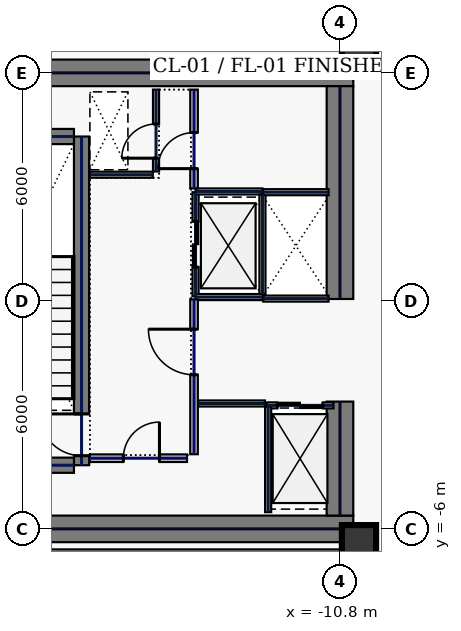
"""IFC4 building model, lengths in metres.
Left out: names, types, materials, properties, quantities, classifications, styles, units other than length and angle.
Written with IfcOpenShell. Run it as: python <this file> out.ifc"""

import sys

from ifc_helpers import new_model, si_unit, direction, frame, frame_2d, origin, origin_2d, place, context, subcontext, project, spatial, rectangle, hollow_rectangle, extrude, element, fill, save


model = new_model("IFC4")
c1 = context("Model", 3, precision=1e-05, world=origin(), true_north=direction((0.0, 1.0)))
c2 = subcontext(c1, "Body", "Model", "MODEL_VIEW")
j1 = project(units=[si_unit("LENGTHUNIT", "METRE"), si_unit("PLANEANGLEUNIT", "RADIAN")], contexts=[c1])
p1 = place(None, origin())
s1 = spatial("IfcSite", under=j1, at=p1, CompositionType="ELEMENT")
p2 = place(p1, origin())
s2 = spatial("IfcBuilding", under=s1, at=p2, CompositionType="ELEMENT")
p3 = place(p2, frame((0.0, 0.0, 164.2)))
s3 = spatial("IfcBuildingStorey", under=s2, at=p3, CompositionType="ELEMENT", Elevation=164.2)
for number, where, z_axis, x_axis in (
    (1, (-22.0, 6.0, 0.0), (0.0, 0.0, 1.0), (1.0, 0.0, 0.0)),
    (2, (-22.0, -6.0, 0.0), (0.0, 0.0, 1.0), (1.0, 0.0, 0.0)),
):
    element("IfcWall", number, at=place(p3, frame(where, z_axis=z_axis, x_axis=x_axis)), inside=s3, PredefinedType="SHEAR", context=c2, shape_type="SweptSolid", body=[
        extrude(rectangle(XDim=11.55, YDim=0.7, at=frame_2d((5.775, 0.0))), origin(), (0.0, 0.0, 1.0), 3.74),
    ])
p4 = place(p3, frame((-10.8, -5.65, 0.0), z_axis=(0.0, 0.0, 1.0), x_axis=(0.0, 1.0, 0.0)))
e3 = element("IfcWall", 3, at=p4, inside=s3, PredefinedType="SHEAR", context=c2, shape_type="SweptSolid", body=[
    extrude(rectangle(XDim=3.0, YDim=0.7, at=frame_2d((1.5, 0.0))), origin(), (0.0, 0.0, 1.0), 3.74),
])
p5 = place(p3, frame((-10.8, 0.05, 0.0), z_axis=(0.0, 0.0, 1.0), x_axis=(0.0, 1.0, 0.0)))
e4 = element("IfcWall", 4, at=p5, inside=s3, PredefinedType="SHEAR", context=c2, shape_type="SweptSolid", body=[
    extrude(rectangle(XDim=5.6, YDim=0.7, at=frame_2d((2.8, 0.0))), origin(), (0.0, 0.0, 1.0), 3.74),
])
p6 = place(p3, frame((-17.6, -4.325, 0.0), z_axis=(0.0, 0.0, 1.0), x_axis=(0.0, 1.0, 0.0)))
e5 = element("IfcWall", 5, at=p6, inside=s3, PredefinedType="SHEAR", context=c2, shape_type="SweptSolid", body=[
    extrude(rectangle(XDim=8.65, YDim=0.4, at=frame_2d((4.325, 0.0))), origin(), (0.0, 0.0, 1.0), 3.74),
])
p7 = place(p6, frame((0.25, 0.0, 0.0)))
e6 = element("IfcOpeningElement", 6, at=p7, cuts=e5, PredefinedType="OPENING", context=c2, shape_type="SweptSolid", body=[
    extrude(rectangle(XDim=1.1, YDim=2.2, at=frame_2d((0.55, 1.1))), frame((0.0, 0.21, 0.0), z_axis=(0.0, -1.0, 0.0), x_axis=(1.0, 0.0, 0.0)), (0.0, 0.0, 1.0), 0.42),
])
for number, where, z_axis, x_axis in (
    (7, (-21.2, -4.325, 0.0), (0.0, 0.0, 1.0), (1.0, 0.0, 0.0)),
    (8, (-21.2, 4.325, 0.0), (0.0, 0.0, 1.0), (1.0, 0.0, 0.0)),
):
    element("IfcWall", number, at=place(p3, frame(where, z_axis=z_axis, x_axis=x_axis)), inside=s3, PredefinedType="SHEAR", context=c2, shape_type="SweptSolid", body=[
        extrude(rectangle(XDim=3.4, YDim=0.4, at=frame_2d((1.7, 0.0))), origin(), (0.0, 0.0, 1.0), 3.74),
    ])
for number, where, z_axis, x_axis in (
    (9, (-10.3, -6.35, 0.0), (0.0, 0.0, 1.0), (1.0, 0.0, 0.0)),
    (10, (-10.3, 6.35, 0.0), (0.0, 0.0, 1.0), (1.0, 0.0, 0.0)),
):
    element("IfcColumn", number, at=place(p3, frame(where, z_axis=z_axis, x_axis=x_axis)), inside=s3, PredefinedType="COLUMN", context=c2, shape_type="SweptSolid", body=[
        extrude(hollow_rectangle(XDim=0.9, YDim=0.9, WallThickness=0.04, at=origin_2d()), origin(), (0.0, 0.0, 1.0), 3.74),
    ])
p8 = place(p3, frame((-14.6, 0.12, 0.0), z_axis=(0.0, 0.0, 1.0), x_axis=(0.0, 1.0, 0.0)))
e11 = element("IfcWall", 11, at=p8, inside=s3, PredefinedType="PARTITIONING", context=c2, shape_type="SweptSolid", body=[
    extrude(rectangle(XDim=2.74, YDim=0.16, at=frame_2d((1.37, 0.0))), origin(), (0.0, 0.0, 1.0), 3.74),
])
p9 = place(p8, frame((0.77, 0.0, 0.0)))
e12 = element("IfcOpeningElement", 12, at=p9, cuts=e11, PredefinedType="OPENING", context=c2, shape_type="SweptSolid", body=[
    extrude(rectangle(XDim=1.2, YDim=2.2, at=frame_2d((0.6, 1.1))), frame((0.0, 0.09, 0.0), z_axis=(0.0, -1.0, 0.0), x_axis=(1.0, 0.0, 0.0)), (0.0, 0.0, 1.0), 0.18),
])
for number, where, z_axis, x_axis in (
    (13, (-14.6, 0.1, 0.0), (0.0, 0.0, 1.0), (1.0, 0.0, 0.0)),
    (14, (-14.6, 2.88, 0.0), (0.0, 0.0, 1.0), (1.0, 0.0, 0.0)),
):
    element("IfcWall", number, at=place(p3, frame(where, z_axis=z_axis, x_axis=x_axis)), inside=s3, PredefinedType="PARTITIONING", context=c2, shape_type="SweptSolid", body=[
        extrude(rectangle(XDim=1.76, YDim=0.16, at=frame_2d((0.88, 0.0))), origin(), (0.0, 0.0, 1.0), 3.74),
    ])
p10 = place(p3, frame((-12.84, 0.18, 0.0), z_axis=(0.0, 0.0, 1.0), x_axis=(0.0, 1.0, 0.0)))
e15 = element("IfcWall", 15, at=p10, inside=s3, PredefinedType="PARTITIONING", context=c2, shape_type="SweptSolid", body=[
    extrude(rectangle(XDim=2.62, YDim=0.16, at=frame_2d((1.31, 0.0))), origin(), (0.0, 0.0, 1.0), 3.74),
])
p11 = place(p3, frame((-12.73, -2.75, 0.0), z_axis=(0.0, 0.0, 1.0), x_axis=(1.0, 0.0, 0.0)))
e16 = element("IfcWall", 16, at=p11, inside=s3, PredefinedType="PARTITIONING", context=c2, shape_type="SweptSolid", body=[
    extrude(rectangle(XDim=1.76, YDim=0.16, at=frame_2d((0.88, 0.0))), origin(), (0.0, 0.0, 1.0), 3.74),
])
p12 = place(p11, frame((0.28, 0.0, 0.0)))
e17 = element("IfcOpeningElement", 17, at=p12, cuts=e16, PredefinedType="OPENING", context=c2, shape_type="SweptSolid", body=[
    extrude(rectangle(XDim=1.2, YDim=2.2, at=frame_2d((0.6, 1.1))), frame((0.0, 0.09, 0.0), z_axis=(0.0, -1.0, 0.0), x_axis=(1.0, 0.0, 0.0)), (0.0, 0.0, 1.0), 0.18),
])
for number, where, z_axis, x_axis in (
    (18, (-12.82, 0.06, 0.0), (0.0, 0.0, 1.0), (1.0, 0.0, 0.0)),
    (19, (-12.82, 2.86, 0.0), (0.0, 0.0, 1.0), (1.0, 0.0, 0.0)),
):
    element("IfcWall", number, at=place(p3, frame(where, z_axis=z_axis, x_axis=x_axis)), inside=s3, PredefinedType="PARTITIONING", context=c2, shape_type="SweptSolid", body=[
        extrude(rectangle(XDim=1.72, YDim=0.16, at=frame_2d((0.86, 0.0))), origin(), (0.0, 0.0, 1.0), 3.74),
    ])
p13 = place(p3, frame((-15.64, 3.405, 0.0), z_axis=(0.0, 0.0, 1.0), x_axis=(0.0, 1.0, 0.0)))
e20 = element("IfcWall", 20, at=p13, inside=s3, PredefinedType="PARTITIONING", context=c2, shape_type="SweptSolid", body=[
    extrude(rectangle(XDim=2.155, YDim=0.16, at=frame_2d((1.078, 0.0))), origin(), (0.0, 0.0, 1.0), 3.74),
])
p14 = place(p13, frame((0.35, 0.0, 0.0)))
e21 = element("IfcOpeningElement", 21, at=p14, cuts=e20, PredefinedType="OPENING", context=c2, shape_type="SweptSolid", body=[
    extrude(rectangle(XDim=0.9, YDim=2.2, at=frame_2d((0.45, 1.1))), frame((0.0, 0.09, 0.0), z_axis=(0.0, -1.0, 0.0), x_axis=(1.0, 0.0, 0.0)), (0.0, 0.0, 1.0), 0.18),
])
p15 = place(p3, frame((-17.38, 3.32, 0.0), z_axis=(0.0, 0.0, 1.0), x_axis=(1.0, 0.0, 0.0)))
e22 = element("IfcWall", 22, at=p15, inside=s3, PredefinedType="PARTITIONING", context=c2, shape_type="SweptSolid", body=[
    extrude(rectangle(XDim=1.655, YDim=0.16, at=frame_2d((0.827, 0.0))), origin(), (0.0, 0.0, 1.0), 3.74),
])
p16 = place(p3, frame((-17.38, -4.14, 0.0), z_axis=(0.0, 0.0, 1.0), x_axis=(1.0, 0.0, 0.0)))
e23 = element("IfcWall", 23, at=p16, inside=s3, PredefinedType="SOLIDWALL", context=c2, shape_type="SweptSolid", body=[
    extrude(rectangle(XDim=2.555, YDim=0.2, at=frame_2d((1.277, 0.0))), origin(), (0.0, 0.0, 1.0), 3.74),
])
p17 = place(p16, frame((0.88, 0.0, 0.0)))
e24 = element("IfcOpeningElement", 24, at=p17, cuts=e23, PredefinedType="OPENING", context=c2, shape_type="SweptSolid", body=[
    extrude(rectangle(XDim=0.95, YDim=2.2, at=frame_2d((0.475, 1.1))), frame((0.0, 0.11, 0.0), z_axis=(0.0, -1.0, 0.0), x_axis=(1.0, 0.0, 0.0)), (0.0, 0.0, 1.0), 0.22),
])
p18 = place(p3, frame((-14.535, -2.7, 0.0), z_axis=(0.0, 0.0, 1.0), x_axis=(1.0, 0.0, 0.0)))
e25 = element("IfcWall", 25, at=p18, inside=s3, PredefinedType="PARTITIONING", context=c2, shape_type="SweptSolid", body=[
    extrude(rectangle(XDim=1.76, YDim=0.16, at=frame_2d((0.88, 0.0))), origin(), (0.0, 0.0, 1.0), 3.74),
])
p19 = place(p3, frame((-12.69, -5.56, 0.0), z_axis=(0.0, 0.0, 1.0), x_axis=(0.0, 1.0, 0.0)))
e26 = element("IfcWall", 26, at=p19, inside=s3, PredefinedType="PARTITIONING", context=c2, shape_type="SweptSolid", body=[
    extrude(rectangle(XDim=2.775, YDim=0.16, at=frame_2d((1.388, 0.0))), origin(), (0.0, 0.0, 1.0), 3.74),
])
p20 = place(p3, frame((-14.64, 2.96, 0.0), z_axis=(0.0, 0.0, 1.0), x_axis=(0.0, 1.0, 0.0)))
e27 = element("IfcWall", 27, at=p20, inside=s3, PredefinedType="SOLIDWALL", context=c2, shape_type="SweptSolid", body=[
    extrude(rectangle(XDim=2.6, YDim=0.2, at=frame_2d((1.3, 0.0))), origin(), (0.0, 0.0, 1.0), 3.74),
])
p21 = place(p20, frame((0.52, 0.0, 0.0)))
e28 = element("IfcOpeningElement", 28, at=p21, cuts=e27, PredefinedType="OPENING", context=c2, shape_type="SweptSolid", body=[
    extrude(rectangle(XDim=0.95, YDim=2.2, at=frame_2d((0.475, 1.1))), frame((0.0, 0.11, 0.0), z_axis=(0.0, -1.0, 0.0), x_axis=(1.0, 0.0, 0.0)), (0.0, 0.0, 1.0), 0.22),
])
p22 = place(p3, frame((-14.64, -4.035, 0.0), z_axis=(0.0, 0.0, 1.0), x_axis=(0.0, 1.0, 0.0)))
e29 = element("IfcWall", 29, at=p22, inside=s3, PredefinedType="SOLIDWALL", context=c2, shape_type="SweptSolid", body=[
    extrude(rectangle(XDim=4.075, YDim=0.2, at=frame_2d((2.038, 0.0))), origin(), (0.0, 0.0, 1.0), 3.74),
])
p23 = place(p22, frame((2.09, 0.0, 0.0)))
e30 = element("IfcOpeningElement", 30, at=p23, cuts=e29, PredefinedType="OPENING", context=c2, shape_type="SweptSolid", body=[
    extrude(rectangle(XDim=1.2, YDim=2.2, at=frame_2d((0.6, 1.1))), frame((0.0, 0.11, 0.0), z_axis=(0.0, -1.0, 0.0), x_axis=(1.0, 0.0, 0.0)), (0.0, 0.0, 1.0), 0.22),
])
p24 = place(p3, frame((-24.965, -6.62, 0.0), z_axis=(0.0, 0.0, 1.0), x_axis=(1.0, 0.0, 0.0)))
e31 = element("IfcWall", 31, at=p24, inside=s3, PredefinedType="PARTITIONING", context=c2, shape_type="SweptSolid", body=[
    extrude(rectangle(XDim=14.335, YDim=0.16, at=frame_2d((7.167, 0.0))), origin(), (0.0, 0.0, 1.0), 3.74),
])
p25 = place(p7, origin())
e32 = element("IfcDoor", 32, at=p25, inside=s3, OperationType="SINGLE_SWING_RIGHT", PredefinedType="DOOR", context=c2, shape_type="SweptSolid", body=[
    extrude(rectangle(XDim=1.1, YDim=2.2, at=frame_2d((0.55, 1.1))), frame((0.0, 0.025, 0.0), z_axis=(0.0, -1.0, 0.0), x_axis=(1.0, 0.0, 0.0)), (0.0, 0.0, 1.0), 0.05),
])
fill(e6, e32)
p26 = place(p9, origin())
e33 = element("IfcDoor", 33, at=p26, inside=s3, OperationType="SLIDING_TO_LEFT", PredefinedType="DOOR", context=c2, shape_type="SweptSolid", body=[
    extrude(rectangle(XDim=1.2, YDim=2.2, at=frame_2d((0.6, 1.1))), frame((0.0, 0.025, 0.0), z_axis=(0.0, -1.0, 0.0), x_axis=(1.0, 0.0, 0.0)), (0.0, 0.0, 1.0), 0.05),
])
fill(e12, e33)
p27 = place(p12, origin())
e34 = element("IfcDoor", 34, at=p27, inside=s3, OperationType="SLIDING_TO_LEFT", PredefinedType="DOOR", context=c2, shape_type="SweptSolid", body=[
    extrude(rectangle(XDim=1.2, YDim=2.2, at=frame_2d((0.6, 1.1))), frame((0.0, 0.025, 0.0), z_axis=(0.0, -1.0, 0.0), x_axis=(1.0, 0.0, 0.0)), (0.0, 0.0, 1.0), 0.05),
])
fill(e17, e34)
p28 = place(p14, origin())
e35 = element("IfcDoor", 35, at=p28, inside=s3, OperationType="SINGLE_SWING_LEFT", PredefinedType="DOOR", context=c2, shape_type="SweptSolid", body=[
    extrude(rectangle(XDim=0.9, YDim=2.2, at=frame_2d((0.45, 1.1))), frame((0.0, 0.025, 0.0), z_axis=(0.0, -1.0, 0.0), x_axis=(1.0, 0.0, 0.0)), (0.0, 0.0, 1.0), 0.05),
])
fill(e21, e35)
p29 = place(p17, origin())
e36 = element("IfcDoor", 36, at=p29, inside=s3, OperationType="SINGLE_SWING_RIGHT", PredefinedType="DOOR", context=c2, shape_type="SweptSolid", body=[
    extrude(rectangle(XDim=0.95, YDim=2.2, at=frame_2d((0.475, 1.1))), frame((0.0, 0.025, 0.0), z_axis=(0.0, -1.0, 0.0), x_axis=(1.0, 0.0, 0.0)), (0.0, 0.0, 1.0), 0.05),
])
fill(e24, e36)
p30 = place(p21, origin())
e37 = element("IfcDoor", 37, at=p30, inside=s3, OperationType="SINGLE_SWING_LEFT", PredefinedType="DOOR", context=c2, shape_type="SweptSolid", body=[
    extrude(rectangle(XDim=0.95, YDim=2.2, at=frame_2d((0.475, 1.1))), frame((0.0, 0.025, 0.0), z_axis=(0.0, -1.0, 0.0), x_axis=(1.0, 0.0, 0.0)), (0.0, 0.0, 1.0), 0.05),
])
fill(e28, e37)
p31 = place(p23, origin())
e38 = element("IfcDoor", 38, at=p31, inside=s3, OperationType="SINGLE_SWING_RIGHT", PredefinedType="DOOR", context=c2, shape_type="SweptSolid", body=[
    extrude(rectangle(XDim=1.2, YDim=2.2, at=frame_2d((0.6, 1.1))), frame((0.0, 0.025, 0.0), z_axis=(0.0, -1.0, 0.0), x_axis=(1.0, 0.0, 0.0)), (0.0, 0.0, 1.0), 0.05),
])
fill(e30, e38)
save(model, sys.argv[1])
